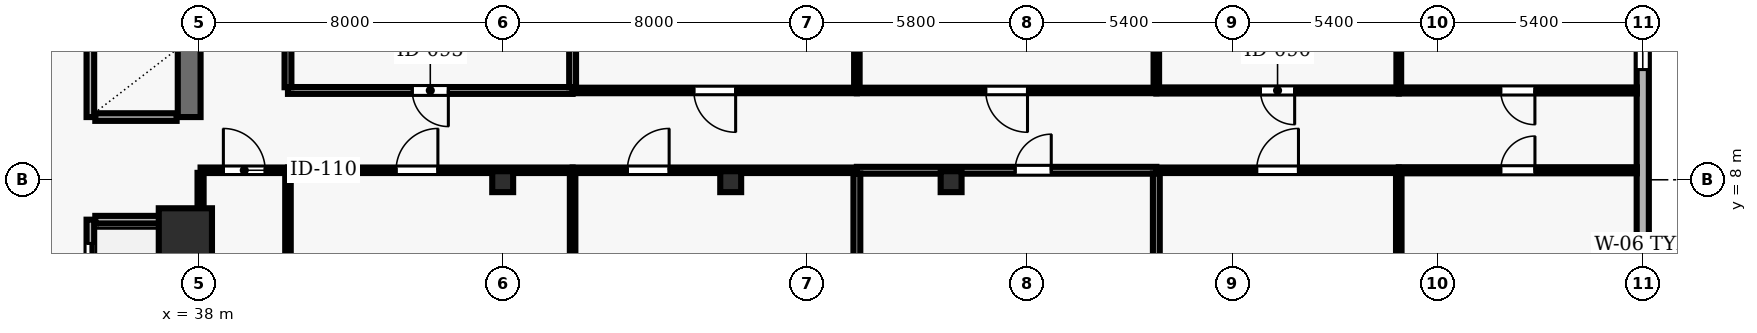
"""IFC4 building model, lengths in metres.
Left out: names, types, materials, properties, quantities, classifications, styles, units other than length and angle.
Written with IfcOpenShell. Run it as: python <this file> out.ifc"""

import sys

from ifc_helpers import new_model, si_unit, direction, frame, frame_2d, origin, origin_2d, place, context, subcontext, project, spatial, rectangle, hollow_rectangle, extrude, element, fill, save


model = new_model("IFC4")
c1 = context("Model", 3, precision=1e-05, world=origin(), true_north=direction((0.0, 1.0)))
c2 = subcontext(c1, "Body", "Model", "MODEL_VIEW")
j1 = project(units=[si_unit("LENGTHUNIT", "METRE"), si_unit("PLANEANGLEUNIT", "RADIAN")], contexts=[c1])
p1 = place(None, origin())
s1 = spatial("IfcSite", under=j1, at=p1, CompositionType="ELEMENT")
p2 = place(p1, origin())
s2 = spatial("IfcBuilding", under=s1, at=p2, CompositionType="ELEMENT")
p3 = place(p2, frame((0.0, 0.0, 66.1)))
s3 = spatial("IfcBuildingStorey", under=s2, at=p3, CompositionType="ELEMENT", Elevation=66.1)
p4 = place(p3, frame((37.65, 6.55, 0.0), z_axis=(0.0, 0.0, 1.0), x_axis=(1.0, 0.0, 0.0)))
e1 = element("IfcColumn", 1, at=p4, inside=s3, PredefinedType="COLUMN", context=c2, shape_type="SweptSolid", body=[
    extrude(rectangle(XDim=1.4, YDim=1.4, at=origin_2d()), origin(), (0.0, 0.0, 1.0), 3.9),
])
for number, where, z_axis, x_axis in (
    (2, (46.0, 7.95, 0.0), (0.0, 0.0, 1.0), (1.0, 0.0, 0.0)),
    (3, (52.0, 7.95, 0.0), (0.0, 0.0, 1.0), (1.0, 0.0, 0.0)),
    (4, (57.8, 7.95, 0.0), (0.0, 0.0, 1.0), (1.0, 0.0, 0.0)),
):
    element("IfcColumn", number, at=place(p3, frame(where, z_axis=z_axis, x_axis=x_axis)), inside=s3, PredefinedType="COLUMN", context=c2, shape_type="SweptSolid", body=[
        extrude(hollow_rectangle(XDim=0.55, YDim=0.55, WallThickness=0.025, at=origin_2d()), origin(), (0.0, 0.0, 1.0), 3.9),
    ])
p5 = place(p3, frame((76.0, 2.5, 0.0), z_axis=(0.0, 0.0, 1.0), x_axis=(0.0, 1.0, 0.0)))
e5 = element("IfcWall", 5, at=p5, inside=s3, PredefinedType="SOLIDWALL", context=c2, shape_type="SweptSolid", body=[
    extrude(rectangle(XDim=11.0, YDim=0.32, at=frame_2d((5.5, 0.0))), origin(), (0.0, 0.0, 1.0), 3.69),
])
p6 = place(p5, frame((2.0, 0.0, 0.9)))
e6 = element("IfcOpeningElement", 6, at=p6, cuts=e5, PredefinedType="OPENING", context=c2, shape_type="SweptSolid", body=[
    extrude(rectangle(XDim=1.5, YDim=1.8, at=frame_2d((0.75, 0.9))), frame((0.0, 0.17, 0.0), z_axis=(0.0, -1.0, 0.0), x_axis=(1.0, 0.0, 0.0)), (0.0, 0.0, 1.0), 0.34),
])
p7 = place(p5, frame((8.4, 0.0, 0.9)))
e7 = element("IfcOpeningElement", 7, at=p7, cuts=e5, PredefinedType="OPENING", context=c2, shape_type="SweptSolid", body=[
    extrude(rectangle(XDim=1.5, YDim=1.8, at=frame_2d((0.75, 0.9))), frame((0.0, 0.17, 0.0), z_axis=(0.0, -1.0, 0.0), x_axis=(1.0, 0.0, 0.0)), (0.0, 0.0, 1.0), 0.34),
])
p8 = place(p3, frame((35.15, 6.95, 0.0), z_axis=(0.0, 0.0, 1.0), x_axis=(0.0, -1.0, 0.0)))
e8 = element("IfcWall", 8, at=p8, inside=s3, PredefinedType="SOLIDWALL", context=c2, shape_type="SweptSolid", body=[
    extrude(rectangle(XDim=2.25, YDim=0.2, at=frame_2d((1.125, 0.0))), origin(), (0.0, 0.0, 1.0), 3.69),
])
p9 = place(p8, frame((0.625, 0.0, 0.0)))
e9 = element("IfcOpeningElement", 9, at=p9, cuts=e8, PredefinedType="OPENING", context=c2, shape_type="SweptSolid", body=[
    extrude(rectangle(XDim=1.0, YDim=2.1, at=frame_2d((0.5, 1.05))), frame((0.0, 0.11, 0.0), z_axis=(0.0, -1.0, 0.0), x_axis=(1.0, 0.0, 0.0)), (0.0, 0.0, 1.0), 0.22),
])
p10 = place(p3, frame((37.75, 4.7, 0.0), z_axis=(0.0, 0.0, 1.0), x_axis=(0.0, 1.0, 0.0)))
e10 = element("IfcWall", 10, at=p10, inside=s3, PredefinedType="SHEAR", context=c2, shape_type="SweptSolid", body=[
    extrude(rectangle(XDim=2.25, YDim=0.6, at=frame_2d((1.125, 0.0))), origin(), (0.0, 0.0, 1.0), 3.69),
])
p11 = place(p3, frame((37.42, 6.95, 0.0), z_axis=(0.0, 0.0, 1.0), x_axis=(-1.0, 0.0, 0.0)))
e11 = element("IfcWall", 11, at=p11, inside=s3, PredefinedType="SOLIDWALL", context=c2, shape_type="SweptSolid", body=[
    extrude(rectangle(XDim=2.14, YDim=0.2, at=frame_2d((1.07, 0.0))), origin(), (0.0, 0.0, 1.0), 3.69),
])
p12 = place(p3, frame((35.15, 11.55, 0.0), z_axis=(0.0, 0.0, 1.0), x_axis=(0.0, -1.0, 0.0)))
e12 = element("IfcWall", 12, at=p12, inside=s3, PredefinedType="SOLIDWALL", context=c2, shape_type="SweptSolid", body=[
    extrude(rectangle(XDim=1.9, YDim=0.2, at=frame_2d((0.95, 0.0))), origin(), (0.0, 0.0, 1.0), 3.69),
])
p13 = place(p3, frame((37.75, 9.65, 0.0), z_axis=(0.0, 0.0, 1.0), x_axis=(0.0, 1.0, 0.0)))
e13 = element("IfcWall", 13, at=p13, inside=s3, PredefinedType="SHEAR", context=c2, shape_type="SweptSolid", body=[
    extrude(rectangle(XDim=1.9, YDim=0.6, at=frame_2d((0.95, 0.0))), origin(), (0.0, 0.0, 1.0), 3.69),
])
p14 = place(p3, frame((35.28, 9.65, 0.0), z_axis=(0.0, 0.0, 1.0), x_axis=(1.0, 0.0, 0.0)))
e14 = element("IfcWall", 14, at=p14, inside=s3, PredefinedType="SOLIDWALL", context=c2, shape_type="SweptSolid", body=[
    extrude(rectangle(XDim=2.14, YDim=0.2, at=frame_2d((1.07, 0.0))), origin(), (0.0, 0.0, 1.0), 3.69),
])
p15 = place(p3, frame((38.05, 8.25, 0.0), z_axis=(0.0, 0.0, 1.0), x_axis=(1.0, 0.0, 0.0)))
e15 = element("IfcWall", 15, at=p15, inside=s3, PredefinedType="PARTITIONING", context=c2, shape_type="SweptSolid", body=[
    extrude(rectangle(XDim=2.3, YDim=0.145, at=frame_2d((1.15, 0.0))), origin(), (0.0, 0.0, 1.0), 3.055),
])
p16 = place(p15, frame((0.6, 0.0, 0.0)))
e16 = element("IfcOpeningElement", 16, at=p16, cuts=e15, PredefinedType="OPENING", context=c2, shape_type="SweptSolid", body=[
    extrude(rectangle(XDim=1.1, YDim=2.15, at=frame_2d((0.55, 1.075))), frame((0.0, 0.083, 0.0), z_axis=(0.0, -1.0, 0.0), x_axis=(1.0, 0.0, 0.0)), (0.0, 0.0, 1.0), 0.165),
])
p17 = place(p3, frame((40.35, 8.25, 0.0), z_axis=(0.0, 0.0, 1.0), x_axis=(1.0, 0.0, 0.0)))
e17 = element("IfcWall", 17, at=p17, inside=s3, PredefinedType="PARTITIONING", context=c2, shape_type="SweptSolid", body=[
    extrude(rectangle(XDim=7.49, YDim=0.145, at=frame_2d((3.745, 0.0))), origin(), (0.0, 0.0, 1.0), 3.055),
])
p18 = place(p17, frame((2.845, 0.0, 0.0)))
e18 = element("IfcOpeningElement", 18, at=p18, cuts=e17, PredefinedType="OPENING", context=c2, shape_type="SweptSolid", body=[
    extrude(rectangle(XDim=1.1, YDim=2.15, at=frame_2d((0.55, 1.075))), frame((0.0, 0.083, 0.0), z_axis=(0.0, -1.0, 0.0), x_axis=(1.0, 0.0, 0.0)), (0.0, 0.0, 1.0), 0.165),
])
p19 = place(p3, frame((47.84, 8.25, 0.0), z_axis=(0.0, 0.0, 1.0), x_axis=(1.0, 0.0, 0.0)))
e19 = element("IfcWall", 19, at=p19, inside=s3, PredefinedType="PARTITIONING", context=c2, shape_type="SweptSolid", body=[
    extrude(rectangle(XDim=7.48, YDim=0.145, at=frame_2d((3.74, 0.0))), origin(), (0.0, 0.0, 1.0), 3.055),
])
p20 = place(p19, frame((1.44, 0.0, 0.0)))
e20 = element("IfcOpeningElement", 20, at=p20, cuts=e19, PredefinedType="OPENING", context=c2, shape_type="SweptSolid", body=[
    extrude(rectangle(XDim=1.1, YDim=2.15, at=frame_2d((0.55, 1.075))), frame((0.0, 0.083, 0.0), z_axis=(0.0, -1.0, 0.0), x_axis=(1.0, 0.0, 0.0)), (0.0, 0.0, 1.0), 0.165),
])
p21 = place(p3, frame((47.84, 10.35, 0.0), z_axis=(0.0, 0.0, 1.0), x_axis=(-1.0, 0.0, 0.0)))
e21 = element("IfcWall", 21, at=p21, inside=s3, PredefinedType="PARTITIONING", context=c2, shape_type="SweptSolid", body=[
    extrude(rectangle(XDim=7.49, YDim=0.18, at=frame_2d((3.745, 0.0))), origin(), (0.0, 0.0, 1.0), 3.277),
])
p22 = place(p21, frame((3.27, 0.0, 0.0)))
e22 = element("IfcOpeningElement", 22, at=p22, cuts=e21, PredefinedType="OPENING", context=c2, shape_type="SweptSolid", body=[
    extrude(rectangle(XDim=0.95, YDim=2.1, at=frame_2d((0.475, 1.05))), frame((0.0, 0.1, 0.0), z_axis=(0.0, -1.0, 0.0), x_axis=(1.0, 0.0, 0.0)), (0.0, 0.0, 1.0), 0.2),
])
p23 = place(p3, frame((55.32, 8.25, 0.0), z_axis=(0.0, 0.0, 1.0), x_axis=(1.0, 0.0, 0.0)))
e23 = element("IfcWall", 23, at=p23, inside=s3, PredefinedType="PARTITIONING", context=c2, shape_type="SweptSolid", body=[
    extrude(rectangle(XDim=7.88, YDim=0.18, at=frame_2d((3.94, 0.0))), origin(), (0.0, 0.0, 1.0), 3.055),
])
p24 = place(p23, frame((4.165, 0.0, 0.0)))
e24 = element("IfcOpeningElement", 24, at=p24, cuts=e23, PredefinedType="OPENING", context=c2, shape_type="SweptSolid", body=[
    extrude(rectangle(XDim=0.95, YDim=2.1, at=frame_2d((0.475, 1.05))), frame((0.0, 0.1, 0.0), z_axis=(0.0, -1.0, 0.0), x_axis=(1.0, 0.0, 0.0)), (0.0, 0.0, 1.0), 0.2),
])
p25 = place(p3, frame((55.32, 10.35, 0.0), z_axis=(0.0, 0.0, 1.0), x_axis=(-1.0, 0.0, 0.0)))
e25 = element("IfcWall", 25, at=p25, inside=s3, PredefinedType="PARTITIONING", context=c2, shape_type="SweptSolid", body=[
    extrude(rectangle(XDim=7.48, YDim=0.145, at=frame_2d((3.74, 0.0))), origin(), (0.0, 0.0, 1.0), 3.277),
])
p26 = place(p25, frame((3.19, 0.0, 0.0)))
e26 = element("IfcOpeningElement", 26, at=p26, cuts=e25, PredefinedType="OPENING", context=c2, shape_type="SweptSolid", body=[
    extrude(rectangle(XDim=1.1, YDim=2.15, at=frame_2d((0.55, 1.075))), frame((0.0, 0.083, 0.0), z_axis=(0.0, -1.0, 0.0), x_axis=(1.0, 0.0, 0.0)), (0.0, 0.0, 1.0), 0.165),
])
p27 = place(p3, frame((63.2, 8.25, 0.0), z_axis=(0.0, 0.0, 1.0), x_axis=(1.0, 0.0, 0.0)))
e27 = element("IfcWall", 27, at=p27, inside=s3, PredefinedType="PARTITIONING", context=c2, shape_type="SweptSolid", body=[
    extrude(rectangle(XDim=6.38, YDim=0.145, at=frame_2d((3.19, 0.0))), origin(), (0.0, 0.0, 1.0), 3.69),
])
p28 = place(p27, frame((2.64, 0.0, 0.0)))
e28 = element("IfcOpeningElement", 28, at=p28, cuts=e27, PredefinedType="OPENING", context=c2, shape_type="SweptSolid", body=[
    extrude(rectangle(XDim=1.1, YDim=2.15, at=frame_2d((0.55, 1.075))), frame((0.0, 0.083, 0.0), z_axis=(0.0, -1.0, 0.0), x_axis=(1.0, 0.0, 0.0)), (0.0, 0.0, 1.0), 0.165),
])
p29 = place(p3, frame((63.2, 10.35, 0.0), z_axis=(0.0, 0.0, 1.0), x_axis=(-1.0, 0.0, 0.0)))
e29 = element("IfcWall", 29, at=p29, inside=s3, PredefinedType="PARTITIONING", context=c2, shape_type="SweptSolid", body=[
    extrude(rectangle(XDim=7.88, YDim=0.145, at=frame_2d((3.94, 0.0))), origin(), (0.0, 0.0, 1.0), 3.277),
])
p30 = place(p29, frame((3.39, 0.0, 0.0)))
e30 = element("IfcOpeningElement", 30, at=p30, cuts=e29, PredefinedType="OPENING", context=c2, shape_type="SweptSolid", body=[
    extrude(rectangle(XDim=1.1, YDim=2.15, at=frame_2d((0.55, 1.075))), frame((0.0, 0.083, 0.0), z_axis=(0.0, -1.0, 0.0), x_axis=(1.0, 0.0, 0.0)), (0.0, 0.0, 1.0), 0.165),
])
p31 = place(p3, frame((69.58, 8.25, 0.0), z_axis=(0.0, 0.0, 1.0), x_axis=(1.0, 0.0, 0.0)))
e31 = element("IfcWall", 31, at=p31, inside=s3, PredefinedType="PARTITIONING", context=c2, shape_type="SweptSolid", body=[
    extrude(rectangle(XDim=6.265, YDim=0.16, at=frame_2d((3.132, 0.0))), origin(), (0.0, 0.0, 1.0), 3.69),
])
p32 = place(p31, frame((2.683, 0.0, 0.0)))
e32 = element("IfcOpeningElement", 32, at=p32, cuts=e31, PredefinedType="OPENING", context=c2, shape_type="SweptSolid", body=[
    extrude(rectangle(XDim=0.9, YDim=2.1, at=frame_2d((0.45, 1.05))), frame((0.0, 0.09, 0.0), z_axis=(0.0, -1.0, 0.0), x_axis=(1.0, 0.0, 0.0)), (0.0, 0.0, 1.0), 0.18),
])
p33 = place(p3, frame((69.58, 10.35, 0.0), z_axis=(0.0, 0.0, 1.0), x_axis=(-1.0, 0.0, 0.0)))
e33 = element("IfcWall", 33, at=p33, inside=s3, PredefinedType="PARTITIONING", context=c2, shape_type="SweptSolid", body=[
    extrude(rectangle(XDim=6.38, YDim=0.16, at=frame_2d((3.19, 0.0))), origin(), (0.0, 0.0, 1.0), 3.277),
])
p34 = place(p33, frame((2.74, 0.0, 0.0)))
e34 = element("IfcOpeningElement", 34, at=p34, cuts=e33, PredefinedType="OPENING", context=c2, shape_type="SweptSolid", body=[
    extrude(rectangle(XDim=0.9, YDim=2.1, at=frame_2d((0.45, 1.05))), frame((0.0, 0.09, 0.0), z_axis=(0.0, -1.0, 0.0), x_axis=(1.0, 0.0, 0.0)), (0.0, 0.0, 1.0), 0.18),
])
p35 = place(p3, frame((75.845, 10.35, 0.0), z_axis=(0.0, 0.0, 1.0), x_axis=(-1.0, 0.0, 0.0)))
e35 = element("IfcWall", 35, at=p35, inside=s3, PredefinedType="PARTITIONING", context=c2, shape_type="SweptSolid", body=[
    extrude(rectangle(XDim=6.265, YDim=0.16, at=frame_2d((3.132, 0.0))), origin(), (0.0, 0.0, 1.0), 3.69),
])
p36 = place(p35, frame((2.683, 0.0, 0.0)))
e36 = element("IfcOpeningElement", 36, at=p36, cuts=e35, PredefinedType="OPENING", context=c2, shape_type="SweptSolid", body=[
    extrude(rectangle(XDim=0.9, YDim=2.1, at=frame_2d((0.45, 1.05))), frame((0.0, 0.09, 0.0), z_axis=(0.0, -1.0, 0.0), x_axis=(1.0, 0.0, 0.0)), (0.0, 0.0, 1.0), 0.18),
])
p37 = place(p3, frame((38.05, 7.05, 0.0), z_axis=(0.0, 0.0, 1.0), x_axis=(0.0, 1.0, 0.0)))
e37 = element("IfcWall", 37, at=p37, inside=s3, PredefinedType="PARTITIONING", context=c2, shape_type="SweptSolid", body=[
    extrude(rectangle(XDim=1.132, YDim=0.16, at=frame_2d((0.566, 0.0))), origin(), (0.0, 0.0, 1.0), 3.055),
])
p38 = place(p3, frame((40.35, 0.155, 0.0), z_axis=(0.0, 0.0, 1.0), x_axis=(0.0, 1.0, 0.0)))
e38 = element("IfcWall", 38, at=p38, inside=s3, PredefinedType="PARTITIONING", context=c2, shape_type="SweptSolid", body=[
    extrude(rectangle(XDim=8.027, YDim=0.145, at=frame_2d((4.013, 0.0))), origin(), (0.0, 0.0, 1.0), 3.69),
])
p39 = place(p3, frame((40.35, 10.435, 0.0), z_axis=(0.0, 0.0, 1.0), x_axis=(0.0, 1.0, 0.0)))
e39 = element("IfcWall", 39, at=p39, inside=s3, PredefinedType="PARTITIONING", context=c2, shape_type="SweptSolid", body=[
    extrude(rectangle(XDim=5.48, YDim=0.18, at=frame_2d((2.74, 0.0))), origin(), (0.0, 0.0, 1.0), 3.277),
])
p40 = place(p3, frame((47.84, 0.155, 0.0), z_axis=(0.0, 0.0, 1.0), x_axis=(0.0, 1.0, 0.0)))
e40 = element("IfcWall", 40, at=p40, inside=s3, PredefinedType="PARTITIONING", context=c2, shape_type="SweptSolid", body=[
    extrude(rectangle(XDim=8.027, YDim=0.145, at=frame_2d((4.013, 0.0))), origin(), (0.0, 0.0, 1.0), 3.69),
])
p41 = place(p3, frame((47.84, 10.435, 0.0), z_axis=(0.0, 0.0, 1.0), x_axis=(0.0, 1.0, 0.0)))
e41 = element("IfcWall", 41, at=p41, inside=s3, PredefinedType="PARTITIONING", context=c2, shape_type="SweptSolid", body=[
    extrude(rectangle(XDim=5.48, YDim=0.18, at=frame_2d((2.74, 0.0))), origin(), (0.0, 0.0, 1.0), 3.69),
])
p42 = place(p3, frame((55.32, 0.155, 0.0), z_axis=(0.0, 0.0, 1.0), x_axis=(0.0, 1.0, 0.0)))
e42 = element("IfcWall", 42, at=p42, inside=s3, PredefinedType="PARTITIONING", context=c2, shape_type="SweptSolid", body=[
    extrude(rectangle(XDim=8.01, YDim=0.18, at=frame_2d((4.005, 0.0))), origin(), (0.0, 0.0, 1.0), 3.69),
])
p43 = place(p3, frame((55.32, 10.418, 0.0), z_axis=(0.0, 0.0, 1.0), x_axis=(0.0, 1.0, 0.0)))
e43 = element("IfcWall", 43, at=p43, inside=s3, PredefinedType="PARTITIONING", context=c2, shape_type="SweptSolid", body=[
    extrude(rectangle(XDim=5.427, YDim=0.145, at=frame_2d((2.713, 0.0))), origin(), (0.0, 0.0, 1.0), 3.69),
])
p44 = place(p3, frame((63.2, 0.155, 0.0), z_axis=(0.0, 0.0, 1.0), x_axis=(0.0, 1.0, 0.0)))
e44 = element("IfcWall", 44, at=p44, inside=s3, PredefinedType="PARTITIONING", context=c2, shape_type="SweptSolid", body=[
    extrude(rectangle(XDim=8.01, YDim=0.18, at=frame_2d((4.005, 0.0))), origin(), (0.0, 0.0, 1.0), 3.055),
])
p45 = place(p3, frame((63.2, 10.425, 0.0), z_axis=(0.0, 0.0, 1.0), x_axis=(0.0, 1.0, 0.0)))
e45 = element("IfcWall", 45, at=p45, inside=s3, PredefinedType="PARTITIONING", context=c2, shape_type="SweptSolid", body=[
    extrude(rectangle(XDim=5.42, YDim=0.145, at=frame_2d((2.71, 0.0))), origin(), (0.0, 0.0, 1.0), 3.055),
])
p46 = place(p3, frame((69.58, 0.155, 0.0), z_axis=(0.0, 0.0, 1.0), x_axis=(0.0, 1.0, 0.0)))
e46 = element("IfcWall", 46, at=p46, inside=s3, PredefinedType="PARTITIONING", context=c2, shape_type="SweptSolid", body=[
    extrude(rectangle(XDim=8.02, YDim=0.145, at=frame_2d((4.01, 0.0))), origin(), (0.0, 0.0, 1.0), 3.69),
])
p47 = place(p3, frame((69.58, 10.425, 0.0), z_axis=(0.0, 0.0, 1.0), x_axis=(0.0, 1.0, 0.0)))
e47 = element("IfcWall", 47, at=p47, inside=s3, PredefinedType="PARTITIONING", context=c2, shape_type="SweptSolid", body=[
    extrude(rectangle(XDim=5.42, YDim=0.125, at=frame_2d((2.71, 0.0))), origin(), (0.0, 0.0, 1.0), 3.69),
])
p48 = place(p7, origin())
e48 = element("IfcWindow", 48, at=p48, inside=s3, PartitioningType="SINGLE_PANEL", PredefinedType="WINDOW", context=c2, shape_type="SweptSolid", body=[
    extrude(rectangle(XDim=1.5, YDim=1.8, at=frame_2d((0.75, 0.9))), frame((0.0, 0.03, 0.0), z_axis=(0.0, -1.0, 0.0), x_axis=(1.0, 0.0, 0.0)), (0.0, 0.0, 1.0), 0.06),
])
fill(e7, e48)
p49 = place(p9, origin())
e49 = element("IfcDoor", 49, at=p49, inside=s3, OperationType="DOUBLE_DOOR_SLIDING", PredefinedType="DOOR", context=c2, shape_type="SweptSolid", body=[
    extrude(rectangle(XDim=1.0, YDim=2.1, at=frame_2d((0.5, 1.05))), frame((0.0, 0.025, 0.0), z_axis=(0.0, -1.0, 0.0), x_axis=(1.0, 0.0, 0.0)), (0.0, 0.0, 1.0), 0.05),
])
fill(e9, e49)
p50 = place(p16, origin())
e50 = element("IfcDoor", 50, at=p50, inside=s3, OperationType="SINGLE_SWING_LEFT", PredefinedType="DOOR", context=c2, shape_type="SweptSolid", body=[
    extrude(rectangle(XDim=1.1, YDim=2.15, at=frame_2d((0.55, 1.075))), frame((0.0, 0.025, 0.0), z_axis=(0.0, -1.0, 0.0), x_axis=(1.0, 0.0, 0.0)), (0.0, 0.0, 1.0), 0.05),
])
fill(e16, e50)
p51 = place(p18, origin())
e51 = element("IfcDoor", 51, at=p51, inside=s3, OperationType="SINGLE_SWING_RIGHT", PredefinedType="DOOR", context=c2, shape_type="SweptSolid", body=[
    extrude(rectangle(XDim=1.1, YDim=2.15, at=frame_2d((0.55, 1.075))), frame((0.0, 0.025, 0.0), z_axis=(0.0, -1.0, 0.0), x_axis=(1.0, 0.0, 0.0)), (0.0, 0.0, 1.0), 0.05),
])
fill(e18, e51)
p52 = place(p22, origin())
e52 = element("IfcDoor", 52, at=p52, inside=s3, OperationType="SINGLE_SWING_LEFT", PredefinedType="DOOR", context=c2, shape_type="SweptSolid", body=[
    extrude(rectangle(XDim=0.95, YDim=2.1, at=frame_2d((0.475, 1.05))), frame((0.0, 0.025, 0.0), z_axis=(0.0, -1.0, 0.0), x_axis=(1.0, 0.0, 0.0)), (0.0, 0.0, 1.0), 0.05),
])
fill(e22, e52)
p53 = place(p20, origin())
e53 = element("IfcDoor", 53, at=p53, inside=s3, OperationType="SINGLE_SWING_RIGHT", PredefinedType="DOOR", context=c2, shape_type="SweptSolid", body=[
    extrude(rectangle(XDim=1.1, YDim=2.15, at=frame_2d((0.55, 1.075))), frame((0.0, 0.025, 0.0), z_axis=(0.0, -1.0, 0.0), x_axis=(1.0, 0.0, 0.0)), (0.0, 0.0, 1.0), 0.05),
])
fill(e20, e53)
p54 = place(p26, origin())
e54 = element("IfcDoor", 54, at=p54, inside=s3, OperationType="SINGLE_SWING_LEFT", PredefinedType="DOOR", context=c2, shape_type="SweptSolid", body=[
    extrude(rectangle(XDim=1.1, YDim=2.15, at=frame_2d((0.55, 1.075))), frame((0.0, 0.025, 0.0), z_axis=(0.0, -1.0, 0.0), x_axis=(1.0, 0.0, 0.0)), (0.0, 0.0, 1.0), 0.05),
])
fill(e26, e54)
p55 = place(p24, origin())
e55 = element("IfcDoor", 55, at=p55, inside=s3, OperationType="SINGLE_SWING_RIGHT", PredefinedType="DOOR", context=c2, shape_type="SweptSolid", body=[
    extrude(rectangle(XDim=0.95, YDim=2.1, at=frame_2d((0.475, 1.05))), frame((0.0, 0.025, 0.0), z_axis=(0.0, -1.0, 0.0), x_axis=(1.0, 0.0, 0.0)), (0.0, 0.0, 1.0), 0.05),
])
fill(e24, e55)
p56 = place(p30, origin())
e56 = element("IfcDoor", 56, at=p56, inside=s3, OperationType="SINGLE_SWING_LEFT", PredefinedType="DOOR", context=c2, shape_type="SweptSolid", body=[
    extrude(rectangle(XDim=1.1, YDim=2.15, at=frame_2d((0.55, 1.075))), frame((0.0, 0.025, 0.0), z_axis=(0.0, -1.0, 0.0), x_axis=(1.0, 0.0, 0.0)), (0.0, 0.0, 1.0), 0.05),
])
fill(e30, e56)
p57 = place(p28, origin())
e57 = element("IfcDoor", 57, at=p57, inside=s3, OperationType="SINGLE_SWING_RIGHT", PredefinedType="DOOR", context=c2, shape_type="SweptSolid", body=[
    extrude(rectangle(XDim=1.1, YDim=2.15, at=frame_2d((0.55, 1.075))), frame((0.0, 0.025, 0.0), z_axis=(0.0, -1.0, 0.0), x_axis=(1.0, 0.0, 0.0)), (0.0, 0.0, 1.0), 0.05),
])
fill(e28, e57)
p58 = place(p34, origin())
e58 = element("IfcDoor", 58, at=p58, inside=s3, OperationType="SINGLE_SWING_LEFT", PredefinedType="DOOR", context=c2, shape_type="SweptSolid", body=[
    extrude(rectangle(XDim=0.9, YDim=2.1, at=frame_2d((0.45, 1.05))), frame((0.0, 0.025, 0.0), z_axis=(0.0, -1.0, 0.0), x_axis=(1.0, 0.0, 0.0)), (0.0, 0.0, 1.0), 0.05),
])
fill(e34, e58)
p59 = place(p32, origin())
e59 = element("IfcDoor", 59, at=p59, inside=s3, OperationType="SINGLE_SWING_RIGHT", PredefinedType="DOOR", context=c2, shape_type="SweptSolid", body=[
    extrude(rectangle(XDim=0.9, YDim=2.1, at=frame_2d((0.45, 1.05))), frame((0.0, 0.025, 0.0), z_axis=(0.0, -1.0, 0.0), x_axis=(1.0, 0.0, 0.0)), (0.0, 0.0, 1.0), 0.05),
])
fill(e32, e59)
p60 = place(p36, origin())
e60 = element("IfcDoor", 60, at=p60, inside=s3, OperationType="SINGLE_SWING_LEFT", PredefinedType="DOOR", context=c2, shape_type="SweptSolid", body=[
    extrude(rectangle(XDim=0.9, YDim=2.1, at=frame_2d((0.45, 1.05))), frame((0.0, 0.025, 0.0), z_axis=(0.0, -1.0, 0.0), x_axis=(1.0, 0.0, 0.0)), (0.0, 0.0, 1.0), 0.05),
])
fill(e36, e60)
save(model, sys.argv[1])
